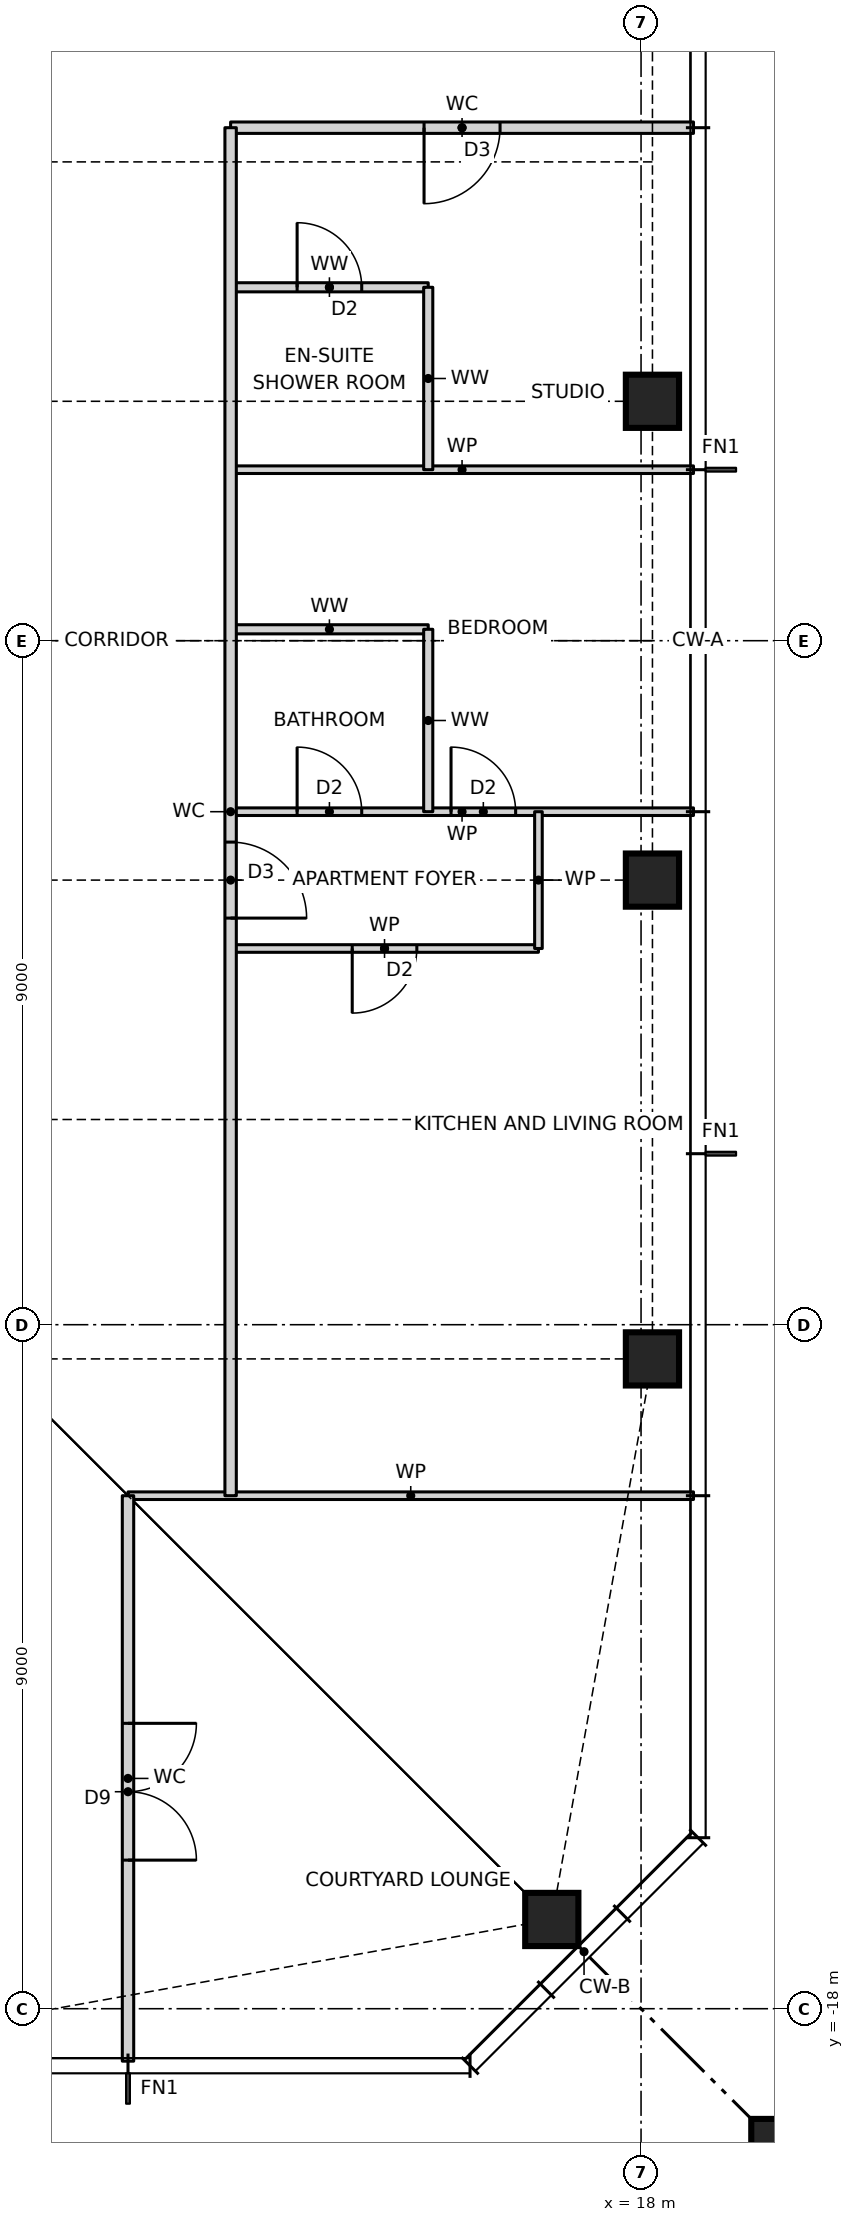
"""IFC4 building model, lengths in metres.
Left out: names, types, materials, properties, quantities, classifications, styles, units other than length and angle.
Written with IfcOpenShell. Run it as: python <this file> out.ifc"""

import sys

from ifc_helpers import new_model, si_unit, direction, frame, frame_2d, origin, origin_2d, place, context, subcontext, project, spatial, rectangle, hollow_rectangle, i_section, extrude, element, fill, save


model = new_model("IFC4")
c1 = context("Model", 3, precision=1e-05, world=origin(), true_north=direction((0.0, 1.0)))
c2 = subcontext(c1, "Body", "Model", "MODEL_VIEW")
j1 = project(units=[si_unit("LENGTHUNIT", "METRE"), si_unit("PLANEANGLEUNIT", "RADIAN")], contexts=[c1])
p1 = place(None, origin())
s1 = spatial("IfcSite", under=j1, at=p1, CompositionType="ELEMENT")
p2 = place(p1, origin())
s2 = spatial("IfcBuilding", under=s1, at=p2, CompositionType="ELEMENT")
p3 = place(p2, frame((0.0, 0.0, 167.0)))
s3 = spatial("IfcBuildingStorey", under=s2, at=p3, CompositionType="ELEMENT", Elevation=167.0)
for number, where, z_axis, x_axis in (
    (1, (16.826, -16.826, 0.0), (0.0, 0.0, 1.0), (1.0, 0.0, 0.0)),
    (2, (18.15, -9.45, 0.0), (0.0, 0.0, 1.0), (1.0, 0.0, 0.0)),
    (3, (18.15, -3.15, 0.0), (0.0, 0.0, 1.0), (1.0, 0.0, 0.0)),
    (4, (18.15, 3.15, 0.0), (0.0, 0.0, 1.0), (1.0, 0.0, 0.0)),
):
    element("IfcColumn", number, at=place(p3, frame(where, z_axis=z_axis, x_axis=x_axis)), inside=s3, PredefinedType="COLUMN", context=c2, shape_type="SweptSolid", body=[
        extrude(hollow_rectangle(XDim=0.7, YDim=0.7, WallThickness=0.06, at=origin_2d()), origin(), (0.0, 0.0, 1.0), 3.5),
    ])
p4 = place(p3, frame((21.65, -21.65, 0.0), z_axis=(0.0, 0.0, 1.0), x_axis=(1.0, 0.0, 0.0)))
e5 = element("IfcColumn", 5, at=p4, inside=s3, PredefinedType="COLUMN", context=c2, shape_type="SweptSolid", body=[
    extrude(rectangle(XDim=4.4, YDim=4.4, at=origin_2d()), origin(), (0.0, 0.0, 1.0), 3.5),
    extrude(i_section(OverallWidth=0.478, OverallDepth=0.599, WebThickness=0.1, FlangeThickness=0.14, at=origin_2d()), origin(), (0.0, 0.0, 1.0), 3.5),
])
p5 = place(p3, frame((11.25, -11.25, 0.0), z_axis=(0.0, 0.0, 1.0), x_axis=(1.0, 0.0, 0.0)))
e6 = element("IfcWall", 6, at=p5, inside=s3, PredefinedType="PARTITIONING", context=c2, shape_type="SweptSolid", body=[
    extrude(rectangle(XDim=7.44, YDim=0.1, at=frame_2d((3.72, 0.0))), origin(), (0.0, 0.0, 1.0), 3.27),
])
p6 = place(p3, frame((12.6, -4.05, 0.0), z_axis=(0.0, 0.0, 1.0), x_axis=(1.0, 0.0, 0.0)))
e7 = element("IfcWall", 7, at=p6, inside=s3, PredefinedType="PARTITIONING", context=c2, shape_type="SweptSolid", body=[
    extrude(rectangle(XDim=4.05, YDim=0.1, at=frame_2d((2.025, 0.0))), origin(), (0.0, 0.0, 1.0), 3.27),
])
p7 = place(p6, frame((1.6, 0.0, 0.0)))
e8 = element("IfcOpeningElement", 8, at=p7, cuts=e7, PredefinedType="OPENING", context=c2, shape_type="SweptSolid", body=[
    extrude(rectangle(XDim=0.85, YDim=2.1, at=frame_2d((0.425, 1.05))), frame((0.0, 0.06, 0.0), z_axis=(0.0, -1.0, 0.0), x_axis=(1.0, 0.0, 0.0)), (0.0, 0.0, 1.0), 0.12),
])
p8 = place(p3, frame((12.6, -2.25, 0.0), z_axis=(0.0, 0.0, 1.0), x_axis=(1.0, 0.0, 0.0)))
e9 = element("IfcWall", 9, at=p8, inside=s3, PredefinedType="PARTITIONING", context=c2, shape_type="SweptSolid", body=[
    extrude(rectangle(XDim=6.09, YDim=0.1, at=frame_2d((3.045, 0.0))), origin(), (0.0, 0.0, 1.0), 3.27),
])
p9 = place(p8, frame((2.9, 0.0, 0.0)))
e10 = element("IfcOpeningElement", 10, at=p9, cuts=e9, PredefinedType="OPENING", context=c2, shape_type="SweptSolid", body=[
    extrude(rectangle(XDim=0.85, YDim=2.1, at=frame_2d((0.425, 1.05))), frame((0.0, 0.06, 0.0), z_axis=(0.0, -1.0, 0.0), x_axis=(1.0, 0.0, 0.0)), (0.0, 0.0, 1.0), 0.12),
])
p10 = place(p8, frame((0.875, 0.0, 0.0)))
e11 = element("IfcOpeningElement", 11, at=p10, cuts=e9, PredefinedType="OPENING", context=c2, shape_type="SweptSolid", body=[
    extrude(rectangle(XDim=0.85, YDim=2.1, at=frame_2d((0.425, 1.05))), frame((0.0, 0.06, 0.0), z_axis=(0.0, -1.0, 0.0), x_axis=(1.0, 0.0, 0.0)), (0.0, 0.0, 1.0), 0.12),
])
p11 = place(p3, frame((12.6, 0.15, 0.0), z_axis=(0.0, 0.0, 1.0), x_axis=(1.0, 0.0, 0.0)))
e12 = element("IfcWall", 12, at=p11, inside=s3, PredefinedType="PARTITIONING", context=c2, shape_type="SweptSolid", body=[
    extrude(rectangle(XDim=2.6, YDim=0.12, at=frame_2d((1.3, 0.0))), origin(), (0.0, 0.0, 1.0), 3.27),
])
p12 = place(p3, frame((12.6, 2.25, 0.0), z_axis=(0.0, 0.0, 1.0), x_axis=(1.0, 0.0, 0.0)))
e13 = element("IfcWall", 13, at=p12, inside=s3, PredefinedType="PARTITIONING", context=c2, shape_type="SweptSolid", body=[
    extrude(rectangle(XDim=6.09, YDim=0.1, at=frame_2d((3.045, 0.0))), origin(), (0.0, 0.0, 1.0), 3.27),
])
p13 = place(p3, frame((12.6, 4.65, 0.0), z_axis=(0.0, 0.0, 1.0), x_axis=(1.0, 0.0, 0.0)))
e14 = element("IfcWall", 14, at=p13, inside=s3, PredefinedType="PARTITIONING", context=c2, shape_type="SweptSolid", body=[
    extrude(rectangle(XDim=2.6, YDim=0.12, at=frame_2d((1.3, 0.0))), origin(), (0.0, 0.0, 1.0), 3.27),
])
p14 = place(p13, frame((0.875, 0.0, 0.0)))
e15 = element("IfcOpeningElement", 15, at=p14, cuts=e14, PredefinedType="OPENING", context=c2, shape_type="SweptSolid", body=[
    extrude(rectangle(XDim=0.85, YDim=2.1, at=frame_2d((0.425, 1.05))), frame((0.0, 0.07, 0.0), z_axis=(0.0, -1.0, 0.0), x_axis=(1.0, 0.0, 0.0)), (0.0, 0.0, 1.0), 0.14),
])
p15 = place(p3, frame((12.6, 6.75, 0.0), z_axis=(0.0, 0.0, 1.0), x_axis=(1.0, 0.0, 0.0)))
e16 = element("IfcWall", 16, at=p15, inside=s3, PredefinedType="PARTITIONING", context=c2, shape_type="SweptSolid", body=[
    extrude(rectangle(XDim=6.09, YDim=0.15, at=frame_2d((3.045, 0.0))), origin(), (0.0, 0.0, 1.0), 3.27),
])
p16 = place(p15, frame((2.545, 0.0, 0.0)))
e17 = element("IfcOpeningElement", 17, at=p16, cuts=e16, PredefinedType="OPENING", context=c2, shape_type="SweptSolid", body=[
    extrude(rectangle(XDim=1.0, YDim=2.1, at=frame_2d((0.5, 1.05))), frame((0.0, 0.085, 0.0), z_axis=(0.0, -1.0, 0.0), x_axis=(1.0, 0.0, 0.0)), (0.0, 0.0, 1.0), 0.17),
])
p17 = place(p3, frame((16.65, -4.05, 0.0), z_axis=(0.0, 0.0, 1.0), x_axis=(0.0, 1.0, 0.0)))
e18 = element("IfcWall", 18, at=p17, inside=s3, PredefinedType="PARTITIONING", context=c2, shape_type="SweptSolid", body=[
    extrude(rectangle(XDim=1.8, YDim=0.1, at=frame_2d((0.9, 0.0))), origin(), (0.0, 0.0, 1.0), 3.27),
])
for number, where, z_axis, x_axis in (
    (19, (15.2, -2.25, 0.0), (0.0, 0.0, 1.0), (0.0, 1.0, 0.0)),
    (20, (15.2, 2.25, 0.0), (0.0, 0.0, 1.0), (0.0, 1.0, 0.0)),
):
    element("IfcWall", number, at=place(p3, frame(where, z_axis=z_axis, x_axis=x_axis)), inside=s3, PredefinedType="PARTITIONING", context=c2, shape_type="SweptSolid", body=[
        extrude(rectangle(XDim=2.4, YDim=0.12, at=frame_2d((1.2, 0.0))), origin(), (0.0, 0.0, 1.0), 3.27),
    ])
p18 = place(p3, frame((12.6, -11.25, 0.0), z_axis=(0.0, 0.0, 1.0), x_axis=(0.0, 1.0, 0.0)))
e21 = element("IfcWall", 21, at=p18, inside=s3, PredefinedType="PARTITIONING", context=c2, shape_type="SweptSolid", body=[
    extrude(rectangle(XDim=18.0, YDim=0.15, at=frame_2d((9.0, 0.0))), origin(), (0.0, 0.0, 1.0), 3.27),
])
p19 = place(p18, frame((7.6, 0.0, 0.0)))
e22 = element("IfcOpeningElement", 22, at=p19, cuts=e21, PredefinedType="OPENING", context=c2, shape_type="SweptSolid", body=[
    extrude(rectangle(XDim=1.0, YDim=2.1, at=frame_2d((0.5, 1.05))), frame((0.0, 0.085, 0.0), z_axis=(0.0, -1.0, 0.0), x_axis=(1.0, 0.0, 0.0)), (0.0, 0.0, 1.0), 0.17),
])
p20 = place(p3, frame((11.25, -18.69, 0.0), z_axis=(0.0, 0.0, 1.0), x_axis=(0.0, 1.0, 0.0)))
e23 = element("IfcWall", 23, at=p20, inside=s3, PredefinedType="PARTITIONING", context=c2, shape_type="SweptSolid", body=[
    extrude(rectangle(XDim=7.44, YDim=0.15, at=frame_2d((3.72, 0.0))), origin(), (0.0, 0.0, 1.0), 3.27),
])
p21 = place(p20, frame((2.645, 0.0, 0.0)))
e24 = element("IfcOpeningElement", 24, at=p21, cuts=e23, PredefinedType="OPENING", context=c2, shape_type="SweptSolid", body=[
    extrude(rectangle(XDim=1.8, YDim=2.1, at=frame_2d((0.9, 1.05))), frame((0.0, 0.085, 0.0), z_axis=(0.0, -1.0, 0.0), x_axis=(1.0, 0.0, 0.0)), (0.0, 0.0, 1.0), 0.17),
])
p22 = place(p19, frame((1.0, 0.0, 0.0), z_axis=(0.0, 0.0, 1.0), x_axis=(-1.0, 0.0, 0.0)))
e25 = element("IfcDoor", 25, at=p22, inside=s3, OperationType="SINGLE_SWING_RIGHT", PredefinedType="DOOR", context=c2, shape_type="SweptSolid", body=[
    extrude(rectangle(XDim=1.0, YDim=2.1, at=frame_2d((0.5, 1.05))), frame((0.0, 0.025, 0.0), z_axis=(0.0, -1.0, 0.0), x_axis=(1.0, 0.0, 0.0)), (0.0, 0.0, 1.0), 0.05),
])
fill(e22, e25)
p23 = place(p7, frame((0.85, 0.0, 0.0), z_axis=(0.0, 0.0, 1.0), x_axis=(-1.0, 0.0, 0.0)))
e26 = element("IfcDoor", 26, at=p23, inside=s3, OperationType="SINGLE_SWING_RIGHT", PredefinedType="DOOR", context=c2, shape_type="SweptSolid", body=[
    extrude(rectangle(XDim=0.85, YDim=2.1, at=frame_2d((0.425, 1.05))), frame((0.0, 0.025, 0.0), z_axis=(0.0, -1.0, 0.0), x_axis=(1.0, 0.0, 0.0)), (0.0, 0.0, 1.0), 0.05),
])
fill(e8, e26)
p24 = place(p9, origin())
e27 = element("IfcDoor", 27, at=p24, inside=s3, OperationType="SINGLE_SWING_LEFT", PredefinedType="DOOR", context=c2, shape_type="SweptSolid", body=[
    extrude(rectangle(XDim=0.85, YDim=2.1, at=frame_2d((0.425, 1.05))), frame((0.0, 0.025, 0.0), z_axis=(0.0, -1.0, 0.0), x_axis=(1.0, 0.0, 0.0)), (0.0, 0.0, 1.0), 0.05),
])
fill(e10, e27)
p25 = place(p10, origin())
e28 = element("IfcDoor", 28, at=p25, inside=s3, OperationType="SINGLE_SWING_LEFT", PredefinedType="DOOR", context=c2, shape_type="SweptSolid", body=[
    extrude(rectangle(XDim=0.85, YDim=2.1, at=frame_2d((0.425, 1.05))), frame((0.0, 0.025, 0.0), z_axis=(0.0, -1.0, 0.0), x_axis=(1.0, 0.0, 0.0)), (0.0, 0.0, 1.0), 0.05),
])
fill(e11, e28)
p26 = place(p16, frame((1.0, 0.0, 0.0), z_axis=(0.0, 0.0, 1.0), x_axis=(-1.0, 0.0, 0.0)))
e29 = element("IfcDoor", 29, at=p26, inside=s3, OperationType="SINGLE_SWING_RIGHT", PredefinedType="DOOR", context=c2, shape_type="SweptSolid", body=[
    extrude(rectangle(XDim=1.0, YDim=2.1, at=frame_2d((0.5, 1.05))), frame((0.0, 0.025, 0.0), z_axis=(0.0, -1.0, 0.0), x_axis=(1.0, 0.0, 0.0)), (0.0, 0.0, 1.0), 0.05),
])
fill(e17, e29)
p27 = place(p14, origin())
e30 = element("IfcDoor", 30, at=p27, inside=s3, OperationType="SINGLE_SWING_LEFT", PredefinedType="DOOR", context=c2, shape_type="SweptSolid", body=[
    extrude(rectangle(XDim=0.85, YDim=2.1, at=frame_2d((0.425, 1.05))), frame((0.0, 0.025, 0.0), z_axis=(0.0, -1.0, 0.0), x_axis=(1.0, 0.0, 0.0)), (0.0, 0.0, 1.0), 0.05),
])
fill(e15, e30)
p28 = place(p21, frame((1.8, 0.0, 0.0), z_axis=(0.0, 0.0, 1.0), x_axis=(-1.0, 0.0, 0.0)))
e31 = element("IfcDoor", 31, at=p28, inside=s3, OperationType="DOUBLE_DOOR_SINGLE_SWING", PredefinedType="DOOR", context=c2, shape_type="SweptSolid", body=[
    extrude(rectangle(XDim=1.8, YDim=2.1, at=frame_2d((0.9, 1.05))), frame((0.0, 0.025, 0.0), z_axis=(0.0, -1.0, 0.0), x_axis=(1.0, 0.0, 0.0)), (0.0, 0.0, 1.0), 0.05),
])
fill(e24, e31)
save(model, sys.argv[1])
